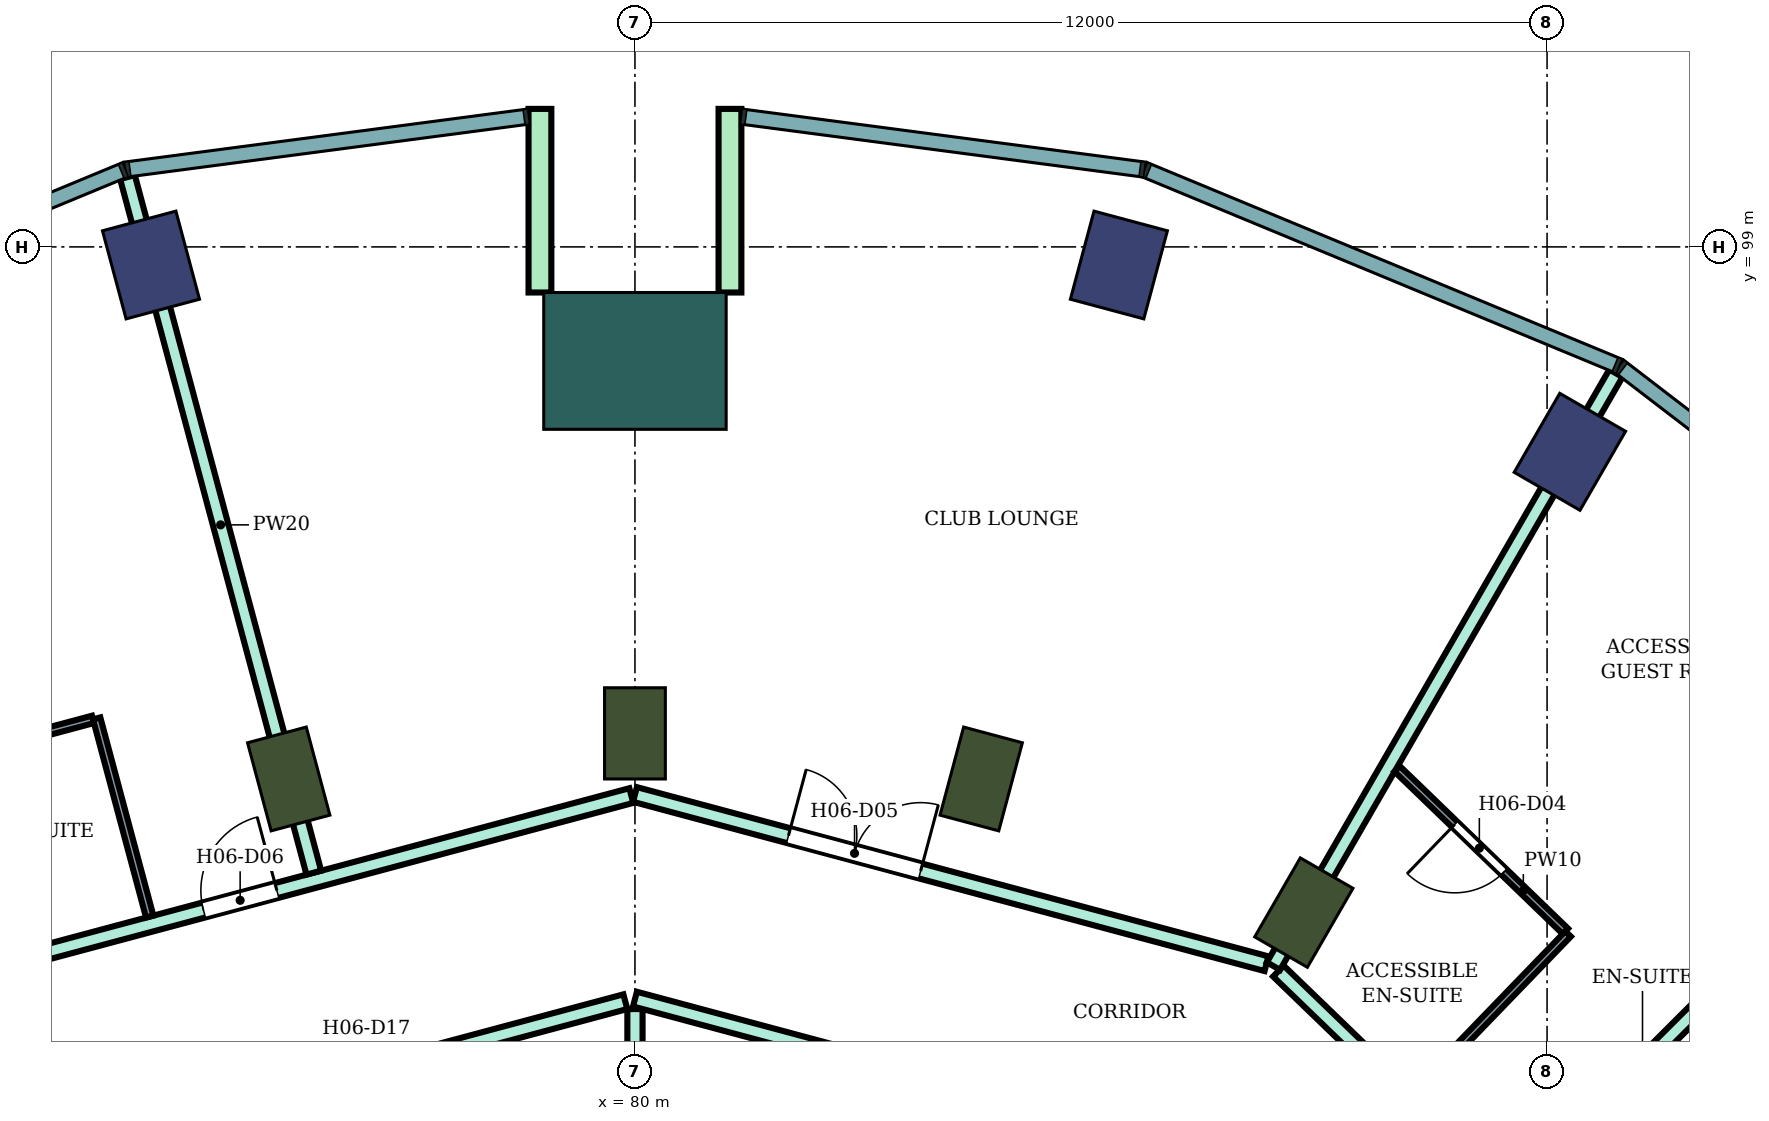
"""IFC4 building model, lengths in metres.
Left out: names, types, materials, properties, quantities, classifications, styles, units other than length and angle.
Written with IfcOpenShell. Run it as: python <this file> out.ifc"""

import sys

from ifc_helpers import new_model, si_unit, direction, frame, frame_2d, origin, origin_2d, place, context, subcontext, project, spatial, rectangle, extrude, element, fill, save


model = new_model("IFC4")
c1 = context("Model", 3, precision=1e-05, world=origin(), true_north=direction((0.0, 1.0)))
c2 = subcontext(c1, "Body", "Model", "MODEL_VIEW")
j1 = project(units=[si_unit("LENGTHUNIT", "METRE"), si_unit("PLANEANGLEUNIT", "RADIAN")], contexts=[c1])
p1 = place(None, origin())
s1 = spatial("IfcSite", under=j1, at=p1, CompositionType="ELEMENT")
p2 = place(p1, origin())
s2 = spatial("IfcBuilding", under=s1, at=p2, CompositionType="ELEMENT")
p3 = place(p2, frame((0.0, 0.0, 97.6)))
s3 = spatial("IfcBuildingStorey", under=s2, at=p3, CompositionType="ELEMENT", Elevation=97.6)
for number, where, z_axis, x_axis in (
    (1, (92.3, 96.304, 0.0), (0.0, 0.0, 1.0), (0.5, 0.866, 0.0)),
    (2, (86.367, 98.762, 0.0), (0.0, 0.0, 1.0), (0.259, 0.966, 0.0)),
    (3, (73.633, 98.762, 0.0), (0.0, 0.0, 1.0), (-0.259, 0.966, 0.0)),
):
    element("IfcColumn", number, at=place(p3, frame(where, z_axis=z_axis, x_axis=x_axis)), inside=s3, PredefinedType="COLUMN", context=c2, shape_type="SweptSolid", body=[
        extrude(rectangle(XDim=1.2, YDim=1.0, at=origin_2d()), origin(), (0.0, 0.0, 1.0), 3.8),
    ])
for number, where, z_axis, x_axis in (
    (4, (88.8, 90.242, 0.0), (0.0, 0.0, 1.0), (0.5, 0.866, 0.0)),
    (5, (84.555, 92.0, 0.0), (0.0, 0.0, 1.0), (0.259, 0.966, 0.0)),
    (6, (80.0, 92.6, 0.0), (0.0, 0.0, 1.0), (0.0, 1.0, 0.0)),
    (7, (75.445, 92.0, 0.0), (0.0, 0.0, 1.0), (-0.259, 0.966, 0.0)),
):
    element("IfcColumn", number, at=place(p3, frame(where, z_axis=z_axis, x_axis=x_axis)), inside=s3, PredefinedType="COLUMN", context=c2, shape_type="SweptSolid", body=[
        extrude(rectangle(XDim=1.2, YDim=0.8, at=origin_2d()), origin(), (0.0, 0.0, 1.0), 3.8),
    ])
p4 = place(p3, frame((80.0, 97.5, 0.0), z_axis=(0.0, 0.0, 1.0), x_axis=(0.0, 1.0, 0.0)))
e8 = element("IfcColumn", 8, at=p4, inside=s3, PredefinedType="COLUMN", context=c2, shape_type="SweptSolid", body=[
    extrude(rectangle(XDim=1.8, YDim=2.4, at=origin_2d()), origin(), (0.0, 0.0, 1.0), 3.8),
])
for number, where, z_axis, x_axis in (
    (9, (81.25, 98.4, 0.0), (0.0, 0.0, 1.0), (0.0, 1.0, 0.0)),
    (10, (78.75, 98.4, 0.0), (0.0, 0.0, 1.0), (0.0, 1.0, 0.0)),
):
    element("IfcWall", number, at=place(p3, frame(where, z_axis=z_axis, x_axis=x_axis)), inside=s3, PredefinedType="NOTDEFINED", context=c2, shape_type="SweptSolid", body=[
        extrude(rectangle(XDim=2.416, YDim=0.3, at=frame_2d((1.208, 0.0))), origin(), (0.0, 0.0, 1.0), 3.8),
    ])
p5 = place(p3, frame((71.614, 89.55, 0.0), z_axis=(0.0, 0.0, 1.0), x_axis=(0.965982378603, 0.258607896685, 0.0)))
e11 = element("IfcWall", 11, at=p5, inside=s3, PredefinedType="PARTITIONING", context=c2, shape_type="SweptSolid", body=[
    extrude(rectangle(XDim=8.632, YDim=0.2, at=frame_2d((4.316, 0.0))), origin(), (0.0, 0.0, 1.0), 3.35),
])
p6 = place(p5, frame((2.804, 0.0, 0.0)))
e12 = element("IfcOpeningElement", 12, at=p6, cuts=e11, PredefinedType="OPENING", context=c2, shape_type="SweptSolid", body=[
    extrude(rectangle(XDim=1.0, YDim=2.1, at=frame_2d((0.5, 1.05))), frame((0.0, 0.11, 0.0), z_axis=(0.0, -1.0, 0.0), x_axis=(1.0, 0.0, 0.0)), (0.0, 0.0, 1.0), 0.22),
])
p7 = place(p3, frame((72.936, 87.211, 0.0), z_axis=(0.0, 0.0, 1.0), x_axis=(0.965917703859, 0.258849356521, 0.0)))
e13 = element("IfcWall", 13, at=p7, inside=s3, PredefinedType="PARTITIONING", context=c2, shape_type="SweptSolid", body=[
    extrude(rectangle(XDim=7.182, YDim=0.2, at=frame_2d((3.591, 0.0))), origin(), (0.0, 0.0, 1.0), 3.35),
])
p8 = place(p7, frame((2.757, 0.0, 0.0)))
e14 = element("IfcOpeningElement", 14, at=p8, cuts=e13, PredefinedType="OPENING", context=c2, shape_type="SweptSolid", body=[
    extrude(rectangle(XDim=1.8, YDim=2.1, at=frame_2d((0.9, 1.05))), frame((0.0, 0.11, 0.0), z_axis=(0.0, -1.0, 0.0), x_axis=(1.0, 0.0, 0.0)), (0.0, 0.0, 1.0), 0.22),
])
p9 = place(p3, frame((73.323, 99.918, 0.0), z_axis=(0.0, 0.0, 1.0), x_axis=(0.258812513968, -0.965927576278, 0.0)))
e15 = element("IfcWall", 15, at=p9, inside=s3, PredefinedType="PARTITIONING", context=c2, shape_type="SweptSolid", body=[
    extrude(rectangle(XDim=9.474, YDim=0.2, at=frame_2d((4.737, 0.0))), origin(), (0.0, 0.0, 1.0), 3.35),
])
p10 = place(p3, frame((80.0, 82.7, 0.0), z_axis=(0.0, 0.0, 1.0), x_axis=(0.0, 1.0, 0.0)))
e16 = element("IfcWall", 16, at=p10, inside=s3, PredefinedType="PARTITIONING", context=c2, shape_type="SweptSolid", body=[
    extrude(rectangle(XDim=6.273, YDim=0.2, at=frame_2d((3.136, 0.0))), origin(), (0.0, 0.0, 1.0), 3.35),
])
p11 = place(p3, frame((80.0, 89.104, 0.0), z_axis=(0.0, 0.0, 1.0), x_axis=(0.965856548257, -0.259077455964, 0.0)))
e17 = element("IfcWall", 17, at=p11, inside=s3, PredefinedType="PARTITIONING", context=c2, shape_type="SweptSolid", body=[
    extrude(rectangle(XDim=7.173, YDim=0.2, at=frame_2d((3.586, 0.0))), origin(), (0.0, 0.0, 1.0), 3.35),
])
p12 = place(p11, frame((5.763, 0.0, 0.0)))
e18 = element("IfcOpeningElement", 18, at=p12, cuts=e17, PredefinedType="OPENING", context=c2, shape_type="SweptSolid", body=[
    extrude(rectangle(XDim=1.0, YDim=2.1, at=frame_2d((0.5, 1.05))), frame((0.0, 0.11, 0.0), z_axis=(0.0, -1.0, 0.0), x_axis=(1.0, 0.0, 0.0)), (0.0, 0.0, 1.0), 0.22),
])
p13 = place(p3, frame((80.0, 91.796, 0.0), z_axis=(0.0, 0.0, 1.0), x_axis=(0.965917643923, -0.258849580177, 0.0)))
e19 = element("IfcWall", 19, at=p13, inside=s3, PredefinedType="PARTITIONING", context=c2, shape_type="SweptSolid", body=[
    extrude(rectangle(XDim=8.602, YDim=0.2, at=frame_2d((4.301, 0.0))), origin(), (0.0, 0.0, 1.0), 3.35),
])
p14 = place(p13, frame((2.091, 0.0, 0.0)))
e20 = element("IfcOpeningElement", 20, at=p14, cuts=e19, PredefinedType="OPENING", context=c2, shape_type="SweptSolid", body=[
    extrude(rectangle(XDim=1.8, YDim=2.1, at=frame_2d((0.9, 1.05))), frame((0.0, 0.11, 0.0), z_axis=(0.0, -1.0, 0.0), x_axis=(1.0, 0.0, 0.0)), (0.0, 0.0, 1.0), 0.22),
])
p15 = place(p3, frame((88.465, 89.473, 0.0), z_axis=(0.0, 0.0, 1.0), x_axis=(0.719474304909, -0.694519059908, 0.0)))
e21 = element("IfcWall", 21, at=p15, inside=s3, PredefinedType="PARTITIONING", context=c2, shape_type="SweptSolid", body=[
    extrude(rectangle(XDim=6.525, YDim=0.2, at=frame_2d((3.263, 0.0))), origin(), (0.0, 0.0, 1.0), 3.35),
])
p16 = place(p15, frame((2.633, 0.0, 0.0)))
e22 = element("IfcOpeningElement", 22, at=p16, cuts=e21, PredefinedType="OPENING", context=c2, shape_type="SweptSolid", body=[
    extrude(rectangle(XDim=1.1, YDim=2.1, at=frame_2d((0.55, 1.05))), frame((0.0, 0.11, 0.0), z_axis=(0.0, -1.0, 0.0), x_axis=(1.0, 0.0, 0.0)), (0.0, 0.0, 1.0), 0.22),
])
p17 = place(p3, frame((88.4, 89.538, 0.0), z_axis=(0.0, 0.0, 1.0), x_axis=(0.500234695877, 0.865889859648, 0.0)))
e23 = element("IfcWall", 23, at=p17, inside=s3, PredefinedType="PARTITIONING", context=c2, shape_type="SweptSolid", body=[
    extrude(rectangle(XDim=9.007, YDim=0.2, at=frame_2d((4.503, 0.0))), origin(), (0.0, 0.0, 1.0), 3.35),
])
p18 = place(p3, frame((91.595, 86.59, 0.0), z_axis=(0.0, 0.0, 1.0), x_axis=(0.707232337591, 0.706981202484, 0.0)))
e24 = element("IfcWall", 24, at=p18, inside=s3, PredefinedType="PARTITIONING", context=c2, shape_type="SweptSolid", body=[
    extrude(rectangle(XDim=6.805, YDim=0.2, at=frame_2d((3.402, 0.0))), origin(), (0.0, 0.0, 1.0), 3.35),
])
p19 = place(p3, frame((70.268, 92.087, 0.0), z_axis=(0.0, 0.0, 1.0), x_axis=(0.965937937835, 0.258773839966, 0.0)))
e25 = element("IfcWall", 25, at=p19, inside=s3, PredefinedType="PARTITIONING", context=c2, shape_type="SweptSolid", body=[
    extrude(rectangle(XDim=2.694, YDim=0.1, at=frame_2d((1.347, 0.0))), origin(), (0.0, 0.0, 1.0), 3.35),
])
p20 = place(p19, frame((0.912, 0.0, 0.0)))
e26 = element("IfcOpeningElement", 26, at=p20, cuts=e25, PredefinedType="OPENING", context=c2, shape_type="SweptSolid", body=[
    extrude(rectangle(XDim=0.8, YDim=2.1, at=frame_2d((0.4, 1.05))), frame((0.0, 0.06, 0.0), z_axis=(0.0, -1.0, 0.0), x_axis=(1.0, 0.0, 0.0)), (0.0, 0.0, 1.0), 0.12),
])
p21 = place(p3, frame((72.918, 92.797, 0.0), z_axis=(0.0, 0.0, 1.0), x_axis=(0.25867580527, -0.965964195904, 0.0)))
e27 = element("IfcWall", 27, at=p21, inside=s3, PredefinedType="PARTITIONING", context=c2, shape_type="SweptSolid", body=[
    extrude(rectangle(XDim=2.699, YDim=0.1, at=frame_2d((1.35, 0.0))), origin(), (0.0, 0.0, 1.0), 3.35),
])
p22 = place(p3, frame((90.027, 92.134, 0.0), z_axis=(0.0, 0.0, 1.0), x_axis=(0.719415132118, -0.694580353652, 0.0)))
e28 = element("IfcWall", 28, at=p22, inside=s3, PredefinedType="PARTITIONING", context=c2, shape_type="SweptSolid", body=[
    extrude(rectangle(XDim=3.077, YDim=0.1, at=frame_2d((1.539, 0.0))), origin(), (0.0, 0.0, 1.0), 3.35),
])
p23 = place(p22, frame((1.053, 0.0, 0.0)))
e29 = element("IfcOpeningElement", 29, at=p23, cuts=e28, PredefinedType="OPENING", context=c2, shape_type="SweptSolid", body=[
    extrude(rectangle(XDim=0.9, YDim=2.1, at=frame_2d((0.45, 1.05))), frame((0.0, 0.06, 0.0), z_axis=(0.0, -1.0, 0.0), x_axis=(1.0, 0.0, 0.0)), (0.0, 0.0, 1.0), 0.12),
])
p24 = place(p3, frame((90.263, 87.876, 0.0), z_axis=(0.0, 0.0, 1.0), x_axis=(0.694534400859, 0.719459495749, 0.0)))
e30 = element("IfcWall", 30, at=p24, inside=s3, PredefinedType="PARTITIONING", context=c2, shape_type="SweptSolid", body=[
    extrude(rectangle(XDim=2.899, YDim=0.1, at=frame_2d((1.45, 0.0))), origin(), (0.0, 0.0, 1.0), 3.35),
])
p25 = place(p23, frame((0.9, 0.0, 0.0), z_axis=(0.0, 0.0, 1.0), x_axis=(-1.0, 0.0, 0.0)))
e31 = element("IfcDoor", 31, at=p25, inside=s3, OperationType="SINGLE_SWING_RIGHT", PredefinedType="DOOR", context=c2, shape_type="SweptSolid", body=[
    extrude(rectangle(XDim=0.9, YDim=2.1, at=frame_2d((0.45, 1.05))), frame((0.0, 0.025, 0.0), z_axis=(0.0, -1.0, 0.0), x_axis=(1.0, 0.0, 0.0)), (0.0, 0.0, 1.0), 0.05),
])
fill(e29, e31)
p26 = place(p14, origin())
e32 = element("IfcDoor", 32, at=p26, inside=s3, OperationType="DOUBLE_DOOR_SINGLE_SWING", PredefinedType="DOOR", context=c2, shape_type="SweptSolid", body=[
    extrude(rectangle(XDim=1.8, YDim=2.1, at=frame_2d((0.9, 1.05))), frame((0.0, 0.025, 0.0), z_axis=(0.0, -1.0, 0.0), x_axis=(1.0, 0.0, 0.0)), (0.0, 0.0, 1.0), 0.05),
])
fill(e20, e32)
p27 = place(p6, origin())
e33 = element("IfcDoor", 33, at=p27, inside=s3, OperationType="SINGLE_SWING_RIGHT", PredefinedType="DOOR", context=c2, shape_type="SweptSolid", body=[
    extrude(rectangle(XDim=1.0, YDim=2.1, at=frame_2d((0.5, 1.05))), frame((0.0, 0.025, 0.0), z_axis=(0.0, -1.0, 0.0), x_axis=(1.0, 0.0, 0.0)), (0.0, 0.0, 1.0), 0.05),
])
fill(e12, e33)
save(model, sys.argv[1])
